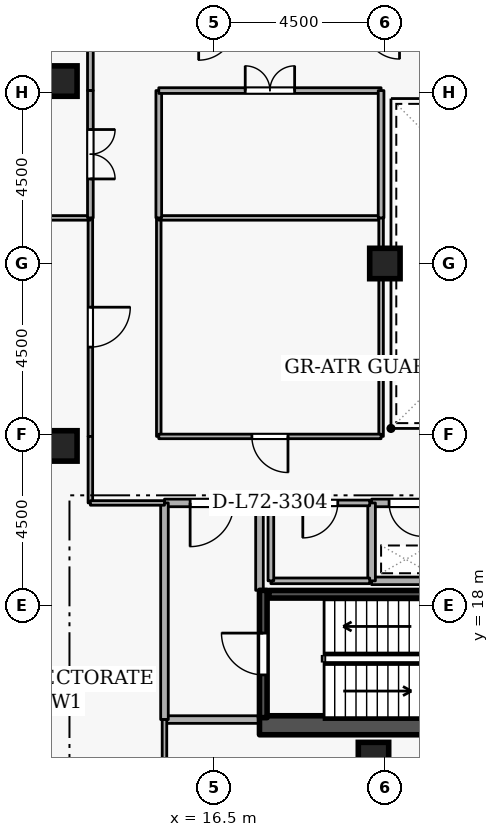
"""IFC4 building model, lengths in metres.
Left out: names, types, materials, properties, quantities, classifications, styles, units other than length and angle.
Written with IfcOpenShell. Run it as: python <this file> out.ifc"""

import sys

from ifc_helpers import new_model, si_unit, direction, frame, frame_2d, origin, origin_2d, place, context, subcontext, project, spatial, rectangle, extrude, element, fill, save


model = new_model("IFC4")
c1 = context("Model", 3, precision=1e-05, world=origin(), true_north=direction((0.0, 1.0)))
c2 = subcontext(c1, "Body", "Model", "MODEL_VIEW")
j1 = project(units=[si_unit("LENGTHUNIT", "METRE"), si_unit("PLANEANGLEUNIT", "RADIAN")], contexts=[c1])
p1 = place(None, origin())
s1 = spatial("IfcSite", under=j1, at=p1, CompositionType="ELEMENT")
p2 = place(p1, origin())
s2 = spatial("IfcBuilding", under=s1, at=p2, CompositionType="ELEMENT")
p3 = place(p2, frame((0.0, 0.0, 269.1)))
s3 = spatial("IfcBuildingStorey", under=s2, at=p3, CompositionType="ELEMENT", Elevation=269.1)
p4 = place(p3, frame((17.7, 14.85, 0.0), z_axis=(0.0, 0.0, 1.0), x_axis=(1.0, 0.0, 0.0)))
e1 = element("IfcWall", 1, at=p4, inside=s3, PredefinedType="SHEAR", context=c2, shape_type="SweptSolid", body=[
    extrude(rectangle(XDim=15.6, YDim=0.5, at=frame_2d((7.8, 0.0))), origin(), (0.0, 0.0, 1.0), 3.6),
])
for number, where, z_axis, x_axis in (
    (2, (12.5, 22.2, 0.0), (0.0, 0.0, 1.0), (1.0, 0.0, 0.0)),
    (3, (12.5, 31.8, 0.0), (0.0, 0.0, 1.0), (1.0, 0.0, 0.0)),
    (4, (20.7, 14.0, 0.0), (0.0, 0.0, 1.0), (1.0, 0.0, 0.0)),
    (5, (21.0, 27.0, 0.0), (0.0, 0.0, 1.0), (1.0, 0.0, 0.0)),
):
    element("IfcColumn", number, at=place(p3, frame(where, z_axis=z_axis, x_axis=x_axis)), inside=s3, PredefinedType="COLUMN", context=c2, shape_type="SweptSolid", body=[
        extrude(rectangle(XDim=0.8, YDim=0.8, at=origin_2d()), origin(), (0.0, 0.0, 1.0), 3.6),
    ])
p5 = place(p3, frame((17.8, 15.05, 0.0), z_axis=(0.0, 0.0, 1.0), x_axis=(0.0, 1.0, 0.0)))
e6 = element("IfcWall", 6, at=p5, inside=s3, PredefinedType="SHEAR", context=c2, shape_type="SweptSolid", body=[
    extrude(rectangle(XDim=3.35, YDim=0.2, at=frame_2d((1.675, 0.0))), origin(), (0.0, 0.0, 1.0), 3.6),
])
p6 = place(p5, frame((1.125, 0.0, 0.0)))
e7 = element("IfcOpeningElement", 7, at=p6, cuts=e6, PredefinedType="OPENING", context=c2, shape_type="SweptSolid", body=[
    extrude(rectangle(XDim=1.1, YDim=2.1, at=frame_2d((0.55, 1.05))), frame((0.0, 0.11, 0.0), z_axis=(0.0, -1.0, 0.0), x_axis=(1.0, 0.0, 0.0)), (0.0, 0.0, 1.0), 0.22),
])
p7 = place(p3, frame((25.05, 18.297, 0.0), z_axis=(0.0, 0.0, 1.0), x_axis=(-1.0, 0.0, 0.0)))
e8 = element("IfcWall", 8, at=p7, inside=s3, PredefinedType="SHEAR", context=c2, shape_type="SweptSolid", body=[
    extrude(rectangle(XDim=7.1, YDim=0.2, at=frame_2d((3.55, 0.0))), origin(), (0.0, 0.0, 1.0), 3.6),
])
p8 = place(p3, frame((15.2, 15.0, 0.0), z_axis=(0.0, 0.0, 1.0), x_axis=(1.0, 0.0, 0.0)))
e9 = element("IfcWall", 9, at=p8, inside=s3, PredefinedType="STANDARD", context=c2, shape_type="SweptSolid", body=[
    extrude(rectangle(XDim=2.5, YDim=0.2, at=frame_2d((1.25, 0.0))), origin(), (0.0, 0.0, 1.0), 3.34),
])
p9 = place(p3, frame((17.7, 18.4, 0.0), z_axis=(0.0, 0.0, 1.0), x_axis=(0.0, 1.0, 0.0)))
e10 = element("IfcWall", 10, at=p9, inside=s3, PredefinedType="STANDARD", context=c2, shape_type="SweptSolid", body=[
    extrude(rectangle(XDim=2.3, YDim=0.2, at=frame_2d((1.15, 0.0))), origin(), (0.0, 0.0, 1.0), 2.545),
])
p10 = place(p3, frame((17.7, 20.7, 0.0), z_axis=(0.0, 0.0, 1.0), x_axis=(-1.0, 0.0, 0.0)))
e11 = element("IfcWall", 11, at=p10, inside=s3, PredefinedType="STANDARD", context=c2, shape_type="SweptSolid", body=[
    extrude(rectangle(XDim=2.5, YDim=0.2, at=frame_2d((1.25, 0.0))), origin(), (0.0, 0.0, 1.0), 3.34),
])
p11 = place(p10, frame((0.675, 0.0, 0.0)))
e12 = element("IfcOpeningElement", 12, at=p11, cuts=e11, PredefinedType="OPENING", context=c2, shape_type="SweptSolid", body=[
    extrude(rectangle(XDim=1.15, YDim=2.1, at=frame_2d((0.575, 1.05))), frame((0.0, 0.11, 0.0), z_axis=(0.0, -1.0, 0.0), x_axis=(1.0, 0.0, 0.0)), (0.0, 0.0, 1.0), 0.22),
])
p12 = place(p3, frame((15.2, 20.7, 0.0), z_axis=(0.0, 0.0, 1.0), x_axis=(0.0, -1.0, 0.0)))
e13 = element("IfcWall", 13, at=p12, inside=s3, PredefinedType="STANDARD", context=c2, shape_type="SweptSolid", body=[
    extrude(rectangle(XDim=5.7, YDim=0.2, at=frame_2d((2.85, 0.0))), origin(), (0.0, 0.0, 1.0), 3.34),
])
p13 = place(p3, frame((20.65, 18.65, 0.0), z_axis=(0.0, 0.0, 1.0), x_axis=(1.0, 0.0, 0.0)))
e14 = element("IfcWall", 14, at=p13, inside=s3, PredefinedType="STANDARD", context=c2, shape_type="SweptSolid", body=[
    extrude(rectangle(XDim=1.8, YDim=0.2, at=frame_2d((0.9, 0.0))), origin(), (0.0, 0.0, 1.0), 3.34),
])
p14 = place(p3, frame((22.45, 20.7, 0.0), z_axis=(0.0, 0.0, 1.0), x_axis=(-1.0, 0.0, 0.0)))
e15 = element("IfcWall", 15, at=p14, inside=s3, PredefinedType="STANDARD", context=c2, shape_type="SweptSolid", body=[
    extrude(rectangle(XDim=1.8, YDim=0.2, at=frame_2d((0.9, 0.0))), origin(), (0.0, 0.0, 1.0), 3.34),
])
p15 = place(p14, frame((0.46, 0.0, 0.0)))
e16 = element("IfcOpeningElement", 16, at=p15, cuts=e15, PredefinedType="OPENING", context=c2, shape_type="SweptSolid", body=[
    extrude(rectangle(XDim=0.88, YDim=2.04, at=frame_2d((0.44, 1.02))), frame((0.0, 0.11, 0.0), z_axis=(0.0, -1.0, 0.0), x_axis=(1.0, 0.0, 0.0)), (0.0, 0.0, 1.0), 0.22),
])
p16 = place(p3, frame((20.65, 20.7, 0.0), z_axis=(0.0, 0.0, 1.0), x_axis=(0.0, -1.0, 0.0)))
e17 = element("IfcWall", 17, at=p16, inside=s3, PredefinedType="STANDARD", context=c2, shape_type="SweptSolid", body=[
    extrude(rectangle(XDim=2.05, YDim=0.2, at=frame_2d((1.025, 0.0))), origin(), (0.0, 0.0, 1.0), 3.34),
])
p17 = place(p3, frame((18.0, 18.65, 0.0), z_axis=(0.0, 0.0, 1.0), x_axis=(1.0, 0.0, 0.0)))
e18 = element("IfcWall", 18, at=p17, inside=s3, PredefinedType="PARTITIONING", context=c2, shape_type="SweptSolid", body=[
    extrude(rectangle(XDim=2.6, YDim=0.15, at=frame_2d((1.3, 0.0))), origin(), (0.0, 0.0, 1.0), 3.34),
])
p18 = place(p3, frame((20.6, 20.7, 0.0), z_axis=(0.0, 0.0, 1.0), x_axis=(-1.0, 0.0, 0.0)))
e19 = element("IfcWall", 19, at=p18, inside=s3, PredefinedType="PARTITIONING", context=c2, shape_type="SweptSolid", body=[
    extrude(rectangle(XDim=2.6, YDim=0.15, at=frame_2d((1.3, 0.0))), origin(), (0.0, 0.0, 1.0), 3.34),
])
p19 = place(p18, frame((0.84, 0.0, 0.0)))
e20 = element("IfcOpeningElement", 20, at=p19, cuts=e19, PredefinedType="OPENING", context=c2, shape_type="SweptSolid", body=[
    extrude(rectangle(XDim=0.92, YDim=2.08, at=frame_2d((0.46, 1.04))), frame((0.0, 0.085, 0.0), z_axis=(0.0, -1.0, 0.0), x_axis=(1.0, 0.0, 0.0)), (0.0, 0.0, 1.0), 0.17),
])
p20 = place(p3, frame((18.0, 20.7, 0.0), z_axis=(0.0, 0.0, 1.0), x_axis=(0.0, -1.0, 0.0)))
e21 = element("IfcWall", 21, at=p20, inside=s3, PredefinedType="PARTITIONING", context=c2, shape_type="SweptSolid", body=[
    extrude(rectangle(XDim=2.05, YDim=0.15, at=frame_2d((1.025, 0.0))), origin(), (0.0, 0.0, 1.0), 2.545),
])
p21 = place(p3, frame((13.25, 28.2, 0.0), z_axis=(0.0, 0.0, 1.0), x_axis=(0.0, -1.0, 0.0)))
e22 = element("IfcWall", 22, at=p21, inside=s3, PredefinedType="PARTITIONING", context=c2, shape_type="SweptSolid", body=[
    extrude(rectangle(XDim=5.75, YDim=0.12, at=frame_2d((2.875, 0.0))), origin(), (0.0, 0.0, 1.0), 3.34),
])
p22 = place(p21, frame((2.35, 0.0, 0.0)))
e23 = element("IfcOpeningElement", 23, at=p22, cuts=e22, PredefinedType="OPENING", context=c2, shape_type="SweptSolid", body=[
    extrude(rectangle(XDim=1.05, YDim=2.1, at=frame_2d((0.525, 1.05))), frame((0.0, 0.07, 0.0), z_axis=(0.0, -1.0, 0.0), x_axis=(1.0, 0.0, 0.0)), (0.0, 0.0, 1.0), 0.14),
])
p23 = place(p3, frame((13.25, 22.45, 0.0), z_axis=(0.0, 0.0, 1.0), x_axis=(0.0, -1.0, 0.0)))
e24 = element("IfcWall", 24, at=p23, inside=s3, PredefinedType="PARTITIONING", context=c2, shape_type="SweptSolid", body=[
    extrude(rectangle(XDim=1.75, YDim=0.12, at=frame_2d((0.875, 0.0))), origin(), (0.0, 0.0, 1.0), 3.34),
])
p24 = place(p3, frame((13.25, 20.7, 0.0), z_axis=(0.0, 0.0, 1.0), x_axis=(1.0, 0.0, 0.0)))
e25 = element("IfcWall", 25, at=p24, inside=s3, PredefinedType="PARTITIONING", context=c2, shape_type="SweptSolid", body=[
    extrude(rectangle(XDim=1.95, YDim=0.12, at=frame_2d((0.975, 0.0))), origin(), (0.0, 0.0, 1.0), 3.34),
])
p25 = place(p3, frame((15.2, 15.0, 0.0), z_axis=(0.0, 0.0, 1.0), x_axis=(0.0, -1.0, 0.0)))
e26 = element("IfcWall", 26, at=p25, inside=s3, PredefinedType="PARTITIONING", context=c2, shape_type="SweptSolid", body=[
    extrude(rectangle(XDim=11.72, YDim=0.12, at=frame_2d((5.86, 0.0))), origin(), (0.0, 0.0, 1.0), 3.34),
])
p26 = place(p3, frame((7.78, 28.2, 0.0), z_axis=(0.0, 0.0, 1.0), x_axis=(1.0, 0.0, 0.0)))
e27 = element("IfcWall", 27, at=p26, inside=s3, PredefinedType="PARTITIONING", context=c2, shape_type="SweptSolid", body=[
    extrude(rectangle(XDim=5.47, YDim=0.12, at=frame_2d((2.735, 0.0))), origin(), (0.0, 0.0, 1.0), 3.34),
])
p27 = place(p3, frame((13.25, 33.3, 0.0), z_axis=(0.0, 0.0, 1.0), x_axis=(0.0, -1.0, 0.0)))
e28 = element("IfcWall", 28, at=p27, inside=s3, PredefinedType="PARTITIONING", context=c2, shape_type="SweptSolid", body=[
    extrude(rectangle(XDim=1.75, YDim=0.15, at=frame_2d((0.875, 0.0))), origin(), (0.0, 0.0, 1.0), 3.34),
])
p28 = place(p3, frame((13.25, 31.55, 0.0), z_axis=(0.0, 0.0, 1.0), x_axis=(0.0, -1.0, 0.0)))
e29 = element("IfcWall", 29, at=p28, inside=s3, PredefinedType="PARTITIONING", context=c2, shape_type="SweptSolid", body=[
    extrude(rectangle(XDim=3.35, YDim=0.15, at=frame_2d((1.675, 0.0))), origin(), (0.0, 0.0, 1.0), 3.34),
])
p29 = place(p28, frame((1.025, 0.0, 0.0)))
e30 = element("IfcOpeningElement", 30, at=p29, cuts=e29, PredefinedType="OPENING", context=c2, shape_type="SweptSolid", body=[
    extrude(rectangle(XDim=1.3, YDim=2.12, at=frame_2d((0.65, 1.06))), frame((0.0, 0.085, 0.0), z_axis=(0.0, -1.0, 0.0), x_axis=(1.0, 0.0, 0.0)), (0.0, 0.0, 1.0), 0.17),
])
p30 = place(p3, frame((15.05, 22.45, 0.0), z_axis=(0.0, 0.0, 1.0), x_axis=(0.0, 1.0, 0.0)))
e31 = element("IfcWall", 31, at=p30, inside=s3, PredefinedType="PARTITIONING", context=c2, shape_type="SweptSolid", body=[
    extrude(rectangle(XDim=5.75, YDim=0.12, at=frame_2d((2.875, 0.0))), origin(), (0.0, 0.0, 1.0), 3.34),
])
p31 = place(p3, frame((15.05, 28.2, 0.0), z_axis=(0.0, 0.0, 1.0), x_axis=(1.0, 0.0, 0.0)))
e32 = element("IfcWall", 32, at=p31, inside=s3, PredefinedType="PARTITIONING", context=c2, shape_type="SweptSolid", body=[
    extrude(rectangle(XDim=5.85, YDim=0.12, at=frame_2d((2.925, 0.0))), origin(), (0.0, 0.0, 1.0), 3.34),
])
p32 = place(p3, frame((20.9, 28.2, 0.0), z_axis=(0.0, 0.0, 1.0), x_axis=(0.0, -1.0, 0.0)))
e33 = element("IfcWall", 33, at=p32, inside=s3, PredefinedType="PARTITIONING", context=c2, shape_type="SweptSolid", body=[
    extrude(rectangle(XDim=5.75, YDim=0.12, at=frame_2d((2.875, 0.0))), origin(), (0.0, 0.0, 1.0), 3.34),
])
p33 = place(p3, frame((20.9, 22.45, 0.0), z_axis=(0.0, 0.0, 1.0), x_axis=(-1.0, 0.0, 0.0)))
e34 = element("IfcWall", 34, at=p33, inside=s3, PredefinedType="PARTITIONING", context=c2, shape_type="SweptSolid", body=[
    extrude(rectangle(XDim=5.85, YDim=0.12, at=frame_2d((2.925, 0.0))), origin(), (0.0, 0.0, 1.0), 3.34),
])
p34 = place(p33, frame((2.45, 0.0, 0.0)))
e35 = element("IfcOpeningElement", 35, at=p34, cuts=e34, PredefinedType="OPENING", context=c2, shape_type="SweptSolid", body=[
    extrude(rectangle(XDim=0.95, YDim=2.1, at=frame_2d((0.475, 1.05))), frame((0.0, 0.07, 0.0), z_axis=(0.0, -1.0, 0.0), x_axis=(1.0, 0.0, 0.0)), (0.0, 0.0, 1.0), 0.14),
])
p35 = place(p3, frame((15.05, 28.2, 0.0), z_axis=(0.0, 0.0, 1.0), x_axis=(0.0, 1.0, 0.0)))
e36 = element("IfcWall", 36, at=p35, inside=s3, PredefinedType="PARTITIONING", context=c2, shape_type="SweptSolid", body=[
    extrude(rectangle(XDim=3.35, YDim=0.15, at=frame_2d((1.675, 0.0))), origin(), (0.0, 0.0, 1.0), 3.34),
])
p36 = place(p3, frame((15.05, 31.55, 0.0), z_axis=(0.0, 0.0, 1.0), x_axis=(1.0, 0.0, 0.0)))
e37 = element("IfcWall", 37, at=p36, inside=s3, PredefinedType="PARTITIONING", context=c2, shape_type="SweptSolid", body=[
    extrude(rectangle(XDim=5.85, YDim=0.15, at=frame_2d((2.925, 0.0))), origin(), (0.0, 0.0, 1.0), 3.34),
])
p37 = place(p36, frame((2.275, 0.0, 0.0)))
e38 = element("IfcOpeningElement", 38, at=p37, cuts=e37, PredefinedType="OPENING", context=c2, shape_type="SweptSolid", body=[
    extrude(rectangle(XDim=1.3, YDim=2.12, at=frame_2d((0.65, 1.06))), frame((0.0, 0.085, 0.0), z_axis=(0.0, -1.0, 0.0), x_axis=(1.0, 0.0, 0.0)), (0.0, 0.0, 1.0), 0.17),
])
p38 = place(p3, frame((20.9, 31.55, 0.0), z_axis=(0.0, 0.0, 1.0), x_axis=(0.0, -1.0, 0.0)))
e39 = element("IfcWall", 39, at=p38, inside=s3, PredefinedType="PARTITIONING", context=c2, shape_type="SweptSolid", body=[
    extrude(rectangle(XDim=3.35, YDim=0.15, at=frame_2d((1.675, 0.0))), origin(), (0.0, 0.0, 1.0), 3.34),
])
p39 = place(p6, origin())
e40 = element("IfcDoor", 40, at=p39, inside=s3, OperationType="SINGLE_SWING_RIGHT", PredefinedType="DOOR", context=c2, shape_type="SweptSolid", body=[
    extrude(rectangle(XDim=1.1, YDim=2.1, at=frame_2d((0.55, 1.05))), frame((0.0, 0.025, 0.0), z_axis=(0.0, -1.0, 0.0), x_axis=(1.0, 0.0, 0.0)), (0.0, 0.0, 1.0), 0.05),
])
fill(e7, e40)
p40 = place(p11, origin())
e41 = element("IfcDoor", 41, at=p40, inside=s3, OperationType="SINGLE_SWING_RIGHT", PredefinedType="DOOR", context=c2, shape_type="SweptSolid", body=[
    extrude(rectangle(XDim=1.15, YDim=2.1, at=frame_2d((0.575, 1.05))), frame((0.0, 0.025, 0.0), z_axis=(0.0, -1.0, 0.0), x_axis=(1.0, 0.0, 0.0)), (0.0, 0.0, 1.0), 0.05),
])
fill(e12, e41)
p41 = place(p15, origin())
e42 = element("IfcDoor", 42, at=p41, inside=s3, OperationType="SINGLE_SWING_LEFT", PredefinedType="DOOR", context=c2, shape_type="SweptSolid", body=[
    extrude(rectangle(XDim=0.88, YDim=2.04, at=frame_2d((0.44, 1.02))), frame((0.0, 0.025, 0.0), z_axis=(0.0, -1.0, 0.0), x_axis=(1.0, 0.0, 0.0)), (0.0, 0.0, 1.0), 0.05),
])
fill(e16, e42)
p42 = place(p19, origin())
e43 = element("IfcDoor", 43, at=p42, inside=s3, OperationType="SINGLE_SWING_RIGHT", PredefinedType="DOOR", context=c2, shape_type="SweptSolid", body=[
    extrude(rectangle(XDim=0.92, YDim=2.08, at=frame_2d((0.46, 1.04))), frame((0.0, 0.025, 0.0), z_axis=(0.0, -1.0, 0.0), x_axis=(1.0, 0.0, 0.0)), (0.0, 0.0, 1.0), 0.05),
])
fill(e20, e43)
p43 = place(p22, origin())
e44 = element("IfcDoor", 44, at=p43, inside=s3, OperationType="SINGLE_SWING_LEFT", PredefinedType="DOOR", context=c2, shape_type="SweptSolid", body=[
    extrude(rectangle(XDim=1.05, YDim=2.1, at=frame_2d((0.525, 1.05))), frame((0.0, 0.025, 0.0), z_axis=(0.0, -1.0, 0.0), x_axis=(1.0, 0.0, 0.0)), (0.0, 0.0, 1.0), 0.05),
])
fill(e23, e44)
p44 = place(p29, origin())
e45 = element("IfcDoor", 45, at=p44, inside=s3, OperationType="DOUBLE_DOOR_SINGLE_SWING", PredefinedType="DOOR", context=c2, shape_type="SweptSolid", body=[
    extrude(rectangle(XDim=1.3, YDim=2.12, at=frame_2d((0.65, 1.06))), frame((0.0, 0.025, 0.0), z_axis=(0.0, -1.0, 0.0), x_axis=(1.0, 0.0, 0.0)), (0.0, 0.0, 1.0), 0.05),
])
fill(e30, e45)
p45 = place(p34, origin())
e46 = element("IfcDoor", 46, at=p45, inside=s3, OperationType="SINGLE_SWING_LEFT", PredefinedType="DOOR", context=c2, shape_type="SweptSolid", body=[
    extrude(rectangle(XDim=0.95, YDim=2.1, at=frame_2d((0.475, 1.05))), frame((0.0, 0.025, 0.0), z_axis=(0.0, -1.0, 0.0), x_axis=(1.0, 0.0, 0.0)), (0.0, 0.0, 1.0), 0.05),
])
fill(e35, e46)
p46 = place(p37, origin())
e47 = element("IfcDoor", 47, at=p46, inside=s3, OperationType="DOUBLE_DOOR_SINGLE_SWING", PredefinedType="DOOR", context=c2, shape_type="SweptSolid", body=[
    extrude(rectangle(XDim=1.3, YDim=2.12, at=frame_2d((0.65, 1.06))), frame((0.0, 0.025, 0.0), z_axis=(0.0, -1.0, 0.0), x_axis=(1.0, 0.0, 0.0)), (0.0, 0.0, 1.0), 0.05),
])
fill(e38, e47)
save(model, sys.argv[1])
